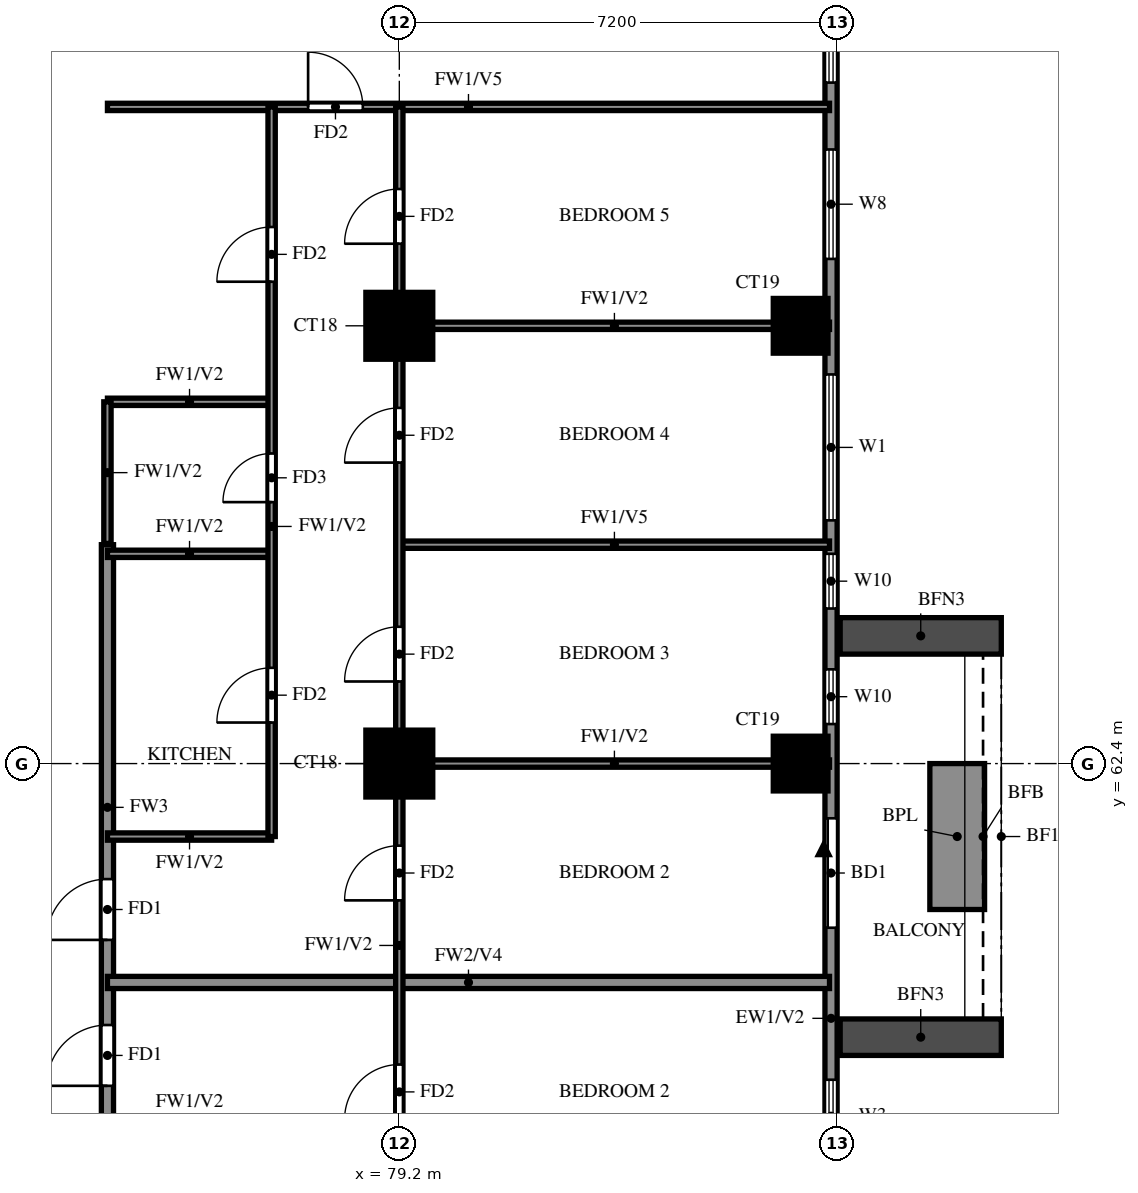
"""IFC4 building model, lengths in metres.
Left out: names, types, materials, properties, quantities, classifications, styles, units other than length and angle.
Written with IfcOpenShell. Run it as: python <this file> out.ifc"""

import sys

from ifc_helpers import new_model, si_unit, direction, frame, frame_2d, origin, origin_2d, place, context, subcontext, project, spatial, rectangle, extrude, source, transform, mapped, element, fill, save


model = new_model("IFC4")
c1 = context("Model", 3, precision=1e-05, world=origin(), true_north=direction((0.0, 1.0)))
c2 = subcontext(c1, "Body", "Model", "MODEL_VIEW")
j1 = project(units=[si_unit("LENGTHUNIT", "METRE"), si_unit("PLANEANGLEUNIT", "RADIAN")], contexts=[c1])
p1 = place(None, origin())
s1 = spatial("IfcSite", under=j1, at=p1, CompositionType="ELEMENT")
p2 = place(p1, origin())
s2 = spatial("IfcBuilding", under=s1, at=p2, CompositionType="ELEMENT")
p3 = place(p2, frame((0.0, 0.0, 127.0)))
s3 = spatial("IfcBuildingStorey", under=s2, at=p3, CompositionType="ELEMENT", Elevation=127.0)
m1 = source(origin(), c2, "Body", "SweptSolid", [
    extrude(rectangle(XDim=1.1, YDim=1.1, at=origin_2d()), origin(), (0.0, 0.0, 1.0), 3.2),
])
p4 = place(p3, frame((79.2, 62.4, 0.0), z_axis=(0.0, 0.0, 1.0), x_axis=(1.0, 0.0, 0.0)))
e1 = element("IfcColumn", 1, at=p4, inside=s3, PredefinedType="COLUMN", context=c2, shape_type="MappedRepresentation", body=[
    mapped(m1, transform((0.0, 0.0, 0.0))),
])
m2 = source(origin(), c2, "Body", "SweptSolid", [
    extrude(rectangle(XDim=0.9, YDim=0.9, at=origin_2d()), origin(), (0.0, 0.0, 1.0), 3.2),
])
p5 = place(p3, frame((85.8, 62.4, 0.0), z_axis=(0.0, 0.0, 1.0), x_axis=(1.0, 0.0, 0.0)))
e2 = element("IfcColumn", 2, at=p5, inside=s3, PredefinedType="COLUMN", context=c2, shape_type="MappedRepresentation", body=[
    mapped(m2, transform((0.0, 0.0, 0.0))),
])
p6 = place(p3, frame((79.2, 69.6, 0.0), z_axis=(0.0, 0.0, 1.0), x_axis=(1.0, 0.0, 0.0)))
e3 = element("IfcColumn", 3, at=p6, inside=s3, PredefinedType="COLUMN", context=c2, shape_type="MappedRepresentation", body=[
    mapped(m1, transform((0.0, 0.0, 0.0))),
])
p7 = place(p3, frame((85.8, 69.6, 0.0), z_axis=(0.0, 0.0, 1.0), x_axis=(1.0, 0.0, 0.0)))
e4 = element("IfcColumn", 4, at=p7, inside=s3, PredefinedType="COLUMN", context=c2, shape_type="MappedRepresentation", body=[
    mapped(m2, transform((0.0, 0.0, 0.0))),
])
p8 = place(p3, frame((86.3, 48.2, 0.0), z_axis=(0.0, 0.0, 1.0), x_axis=(0.0, 1.0, 0.0)))
e5 = element("IfcWall", 5, at=p8, inside=s3, PredefinedType="SOLIDWALL", context=c2, shape_type="SweptSolid", body=[
    extrude(rectangle(XDim=28.6, YDim=0.2, at=frame_2d((14.3, 0.0))), origin(), (0.0, 0.0, 1.0), 3.2),
])
p9 = place(p8, frame((11.5, 0.0, 0.0)))
e6 = element("IfcOpeningElement", 6, at=p9, cuts=e5, PredefinedType="OPENING", context=c2, shape_type="SweptSolid", body=[
    extrude(rectangle(XDim=1.8, YDim=2.4, at=frame_2d((0.9, 1.2))), frame((0.0, 0.11, 0.0), z_axis=(0.0, -1.0, 0.0), x_axis=(1.0, 0.0, 0.0)), (0.0, 0.0, 1.0), 0.22),
])
p10 = place(p8, frame((0.767, 0.0, 0.6)))
e7 = element("IfcOpeningElement", 7, at=p10, cuts=e5, PredefinedType="OPENING", context=c2, shape_type="SweptSolid", body=[
    extrude(rectangle(XDim=2.4, YDim=2.4, at=frame_2d((1.2, 1.2))), frame((0.0, 0.11, 0.0), z_axis=(0.0, -1.0, 0.0), x_axis=(1.0, 0.0, 0.0)), (0.0, 0.0, 1.0), 0.22),
])
p11 = place(p8, frame((3.633, 0.0, 0.6)))
e8 = element("IfcOpeningElement", 8, at=p11, cuts=e5, PredefinedType="OPENING", context=c2, shape_type="SweptSolid", body=[
    extrude(rectangle(XDim=2.4, YDim=2.4, at=frame_2d((1.2, 1.2))), frame((0.0, 0.11, 0.0), z_axis=(0.0, -1.0, 0.0), x_axis=(1.0, 0.0, 0.0)), (0.0, 0.0, 1.0), 0.22),
])
p12 = place(p8, frame((7.8, 0.0, 0.6)))
e9 = element("IfcOpeningElement", 9, at=p12, cuts=e5, PredefinedType="OPENING", context=c2, shape_type="SweptSolid", body=[
    extrude(rectangle(XDim=1.2, YDim=2.4, at=frame_2d((0.6, 1.2))), frame((0.0, 0.11, 0.0), z_axis=(0.0, -1.0, 0.0), x_axis=(1.0, 0.0, 0.0)), (0.0, 0.0, 1.0), 0.22),
])
p13 = place(p8, frame((14.85, 0.0, 0.6)))
e10 = element("IfcOpeningElement", 10, at=p13, cuts=e5, PredefinedType="OPENING", context=c2, shape_type="SweptSolid", body=[
    extrude(rectangle(XDim=0.9, YDim=2.4, at=frame_2d((0.45, 1.2))), frame((0.0, 0.11, 0.0), z_axis=(0.0, -1.0, 0.0), x_axis=(1.0, 0.0, 0.0)), (0.0, 0.0, 1.0), 0.22),
])
p14 = place(p8, frame((16.75, 0.0, 0.6)))
e11 = element("IfcOpeningElement", 11, at=p14, cuts=e5, PredefinedType="OPENING", context=c2, shape_type="SweptSolid", body=[
    extrude(rectangle(XDim=0.9, YDim=2.4, at=frame_2d((0.45, 1.2))), frame((0.0, 0.11, 0.0), z_axis=(0.0, -1.0, 0.0), x_axis=(1.0, 0.0, 0.0)), (0.0, 0.0, 1.0), 0.22),
])
p15 = place(p8, frame((18.2, 0.0, 0.6)))
e12 = element("IfcOpeningElement", 12, at=p15, cuts=e5, PredefinedType="OPENING", context=c2, shape_type="SweptSolid", body=[
    extrude(rectangle(XDim=2.4, YDim=2.4, at=frame_2d((1.2, 1.2))), frame((0.0, 0.11, 0.0), z_axis=(0.0, -1.0, 0.0), x_axis=(1.0, 0.0, 0.0)), (0.0, 0.0, 1.0), 0.22),
])
p16 = place(p8, frame((22.5, 0.0, 0.6)))
e13 = element("IfcOpeningElement", 13, at=p16, cuts=e5, PredefinedType="OPENING", context=c2, shape_type="SweptSolid", body=[
    extrude(rectangle(XDim=1.8, YDim=2.4, at=frame_2d((0.9, 1.2))), frame((0.0, 0.11, 0.0), z_axis=(0.0, -1.0, 0.0), x_axis=(1.0, 0.0, 0.0)), (0.0, 0.0, 1.0), 0.22),
])
p17 = place(p8, frame((25.4, 0.0, 0.6)))
e14 = element("IfcOpeningElement", 14, at=p17, cuts=e5, PredefinedType="OPENING", context=c2, shape_type="SweptSolid", body=[
    extrude(rectangle(XDim=2.4, YDim=2.4, at=frame_2d((1.2, 1.2))), frame((0.0, 0.11, 0.0), z_axis=(0.0, -1.0, 0.0), x_axis=(1.0, 0.0, 0.0)), (0.0, 0.0, 1.0), 0.22),
])
for number, where, z_axis, x_axis in (
    (15, (86.45, 57.9, 0.0), (0.0, 0.0, 1.0), (1.0, 0.0, 0.0)),
    (16, (86.45, 64.5, 0.0), (0.0, 0.0, 1.0), (1.0, 0.0, 0.0)),
):
    element("IfcWall", number, at=place(p3, frame(where, z_axis=z_axis, x_axis=x_axis)), inside=s3, PredefinedType="SOLIDWALL", context=c2, shape_type="SweptSolid", body=[
        extrude(rectangle(XDim=2.65, YDim=0.6, at=frame_2d((1.325, 0.0))), origin(), (0.0, 0.0, 1.0), 2.85),
    ])
p18 = place(p3, frame((88.375, 60.0, 0.0), z_axis=(0.0, 0.0, 1.0), x_axis=(0.0, 1.0, 0.0)))
e17 = element("IfcWall", 17, at=p18, inside=s3, PredefinedType="SOLIDWALL", context=c2, shape_type="SweptSolid", body=[
    extrude(rectangle(XDim=2.4, YDim=0.9, at=frame_2d((1.2, 0.0))), origin(), (0.0, 0.0, 1.0), 0.9),
])
p19 = place(p3, frame((74.4, 56.4, 0.0), z_axis=(0.0, 0.0, 1.0), x_axis=(0.0, 1.0, 0.0)))
e18 = element("IfcWall", 18, at=p19, inside=s3, PredefinedType="SOLIDWALL", context=c2, shape_type="SweptSolid", body=[
    extrude(rectangle(XDim=9.6, YDim=0.2, at=frame_2d((4.8, 0.0))), origin(), (0.0, 0.0, 1.0), 3.2),
])
p20 = place(p19, frame((0.7, 0.0, 0.0)))
e19 = element("IfcOpeningElement", 19, at=p20, cuts=e18, PredefinedType="OPENING", context=c2, shape_type="SweptSolid", body=[
    extrude(rectangle(XDim=1.0, YDim=2.1, at=frame_2d((0.5, 1.05))), frame((0.0, 0.11, 0.0), z_axis=(0.0, -1.0, 0.0), x_axis=(1.0, 0.0, 0.0)), (0.0, 0.0, 1.0), 0.22),
])
p21 = place(p19, frame((3.1, 0.0, 0.0)))
e20 = element("IfcOpeningElement", 20, at=p21, cuts=e18, PredefinedType="OPENING", context=c2, shape_type="SweptSolid", body=[
    extrude(rectangle(XDim=1.0, YDim=2.1, at=frame_2d((0.5, 1.05))), frame((0.0, 0.11, 0.0), z_axis=(0.0, -1.0, 0.0), x_axis=(1.0, 0.0, 0.0)), (0.0, 0.0, 1.0), 0.22),
])
p22 = place(p3, frame((74.4, 58.8, 0.0), z_axis=(0.0, 0.0, 1.0), x_axis=(1.0, 0.0, 0.0)))
e21 = element("IfcWall", 21, at=p22, inside=s3, PredefinedType="SOLIDWALL", context=c2, shape_type="SweptSolid", body=[
    extrude(rectangle(XDim=11.875, YDim=0.2, at=frame_2d((5.938, 0.0))), origin(), (0.0, 0.0, 1.0), 2.3),
])
p23 = place(p3, frame((74.4, 61.2, 0.0), z_axis=(0.0, 0.0, 1.0), x_axis=(1.0, 0.0, 0.0)))
e22 = element("IfcWall", 22, at=p23, inside=s3, PredefinedType="PARTITIONING", context=c2, shape_type="SweptSolid", body=[
    extrude(rectangle(XDim=2.7, YDim=0.12, at=frame_2d((1.35, 0.0))), origin(), (0.0, 0.0, 1.0), 3.2),
])
p24 = place(p3, frame((79.2, 62.4, 0.0), z_axis=(0.0, 0.0, 1.0), x_axis=(1.0, 0.0, 0.0)))
e23 = element("IfcWall", 23, at=p24, inside=s3, PredefinedType="PARTITIONING", context=c2, shape_type="SweptSolid", body=[
    extrude(rectangle(XDim=7.075, YDim=0.12, at=frame_2d((3.538, 0.0))), origin(), (0.0, 0.0, 1.0), 3.2),
])
p25 = place(p3, frame((74.4, 65.85, 0.0), z_axis=(0.0, 0.0, 1.0), x_axis=(1.0, 0.0, 0.0)))
e24 = element("IfcWall", 24, at=p25, inside=s3, PredefinedType="PARTITIONING", context=c2, shape_type="SweptSolid", body=[
    extrude(rectangle(XDim=2.7, YDim=0.12, at=frame_2d((1.35, 0.0))), origin(), (0.0, 0.0, 1.0), 3.2),
])
p26 = place(p3, frame((79.2, 66.0, 0.0), z_axis=(0.0, 0.0, 1.0), x_axis=(1.0, 0.0, 0.0)))
e25 = element("IfcWall", 25, at=p26, inside=s3, PredefinedType="PARTITIONING", context=c2, shape_type="SweptSolid", body=[
    extrude(rectangle(XDim=7.075, YDim=0.12, at=frame_2d((3.538, 0.0))), origin(), (0.0, 0.0, 1.0), 2.3),
])
p27 = place(p3, frame((74.4, 68.35, 0.0), z_axis=(0.0, 0.0, 1.0), x_axis=(1.0, 0.0, 0.0)))
e26 = element("IfcWall", 26, at=p27, inside=s3, PredefinedType="PARTITIONING", context=c2, shape_type="SweptSolid", body=[
    extrude(rectangle(XDim=2.7, YDim=0.12, at=frame_2d((1.35, 0.0))), origin(), (0.0, 0.0, 1.0), 3.2),
])
p28 = place(p3, frame((79.2, 69.6, 0.0), z_axis=(0.0, 0.0, 1.0), x_axis=(1.0, 0.0, 0.0)))
e27 = element("IfcWall", 27, at=p28, inside=s3, PredefinedType="PARTITIONING", context=c2, shape_type="SweptSolid", body=[
    extrude(rectangle(XDim=7.075, YDim=0.12, at=frame_2d((3.538, 0.0))), origin(), (0.0, 0.0, 1.0), 3.2),
])
p29 = place(p3, frame((74.4, 73.2, 0.0), z_axis=(0.0, 0.0, 1.0), x_axis=(1.0, 0.0, 0.0)))
e28 = element("IfcWall", 28, at=p29, inside=s3, PredefinedType="PARTITIONING", context=c2, shape_type="SweptSolid", body=[
    extrude(rectangle(XDim=11.875, YDim=0.12, at=frame_2d((5.938, 0.0))), origin(), (0.0, 0.0, 1.0), 2.3),
])
p30 = place(p29, frame((3.3, 0.0, 0.0)))
e29 = element("IfcOpeningElement", 29, at=p30, cuts=e28, PredefinedType="OPENING", context=c2, shape_type="SweptSolid", body=[
    extrude(rectangle(XDim=0.9, YDim=2.1, at=frame_2d((0.45, 1.05))), frame((0.0, 0.07, 0.0), z_axis=(0.0, -1.0, 0.0), x_axis=(1.0, 0.0, 0.0)), (0.0, 0.0, 1.0), 0.14),
])
p31 = place(p3, frame((74.4, 66.02, 0.0), z_axis=(0.0, 0.0, 1.0), x_axis=(0.0, 1.0, 0.0)))
e30 = element("IfcWall", 30, at=p31, inside=s3, PredefinedType="PARTITIONING", context=c2, shape_type="SweptSolid", body=[
    extrude(rectangle(XDim=2.33, YDim=0.12, at=frame_2d((1.165, 0.0))), origin(), (0.0, 0.0, 1.0), 3.2),
])
p32 = place(p3, frame((77.1, 61.2, 0.0), z_axis=(0.0, 0.0, 1.0), x_axis=(0.0, 1.0, 0.0)))
e31 = element("IfcWall", 31, at=p32, inside=s3, PredefinedType="PARTITIONING", context=c2, shape_type="SweptSolid", body=[
    extrude(rectangle(XDim=12.0, YDim=0.12, at=frame_2d((6.0, 0.0))), origin(), (0.0, 0.0, 1.0), 3.2),
])
p33 = place(p32, frame((1.875, 0.0, 0.0)))
e32 = element("IfcOpeningElement", 32, at=p33, cuts=e31, PredefinedType="OPENING", context=c2, shape_type="SweptSolid", body=[
    extrude(rectangle(XDim=0.9, YDim=2.1, at=frame_2d((0.45, 1.05))), frame((0.0, 0.07, 0.0), z_axis=(0.0, -1.0, 0.0), x_axis=(1.0, 0.0, 0.0)), (0.0, 0.0, 1.0), 0.14),
])
p34 = place(p32, frame((5.5, 0.0, 0.0)))
e33 = element("IfcOpeningElement", 33, at=p34, cuts=e31, PredefinedType="OPENING", context=c2, shape_type="SweptSolid", body=[
    extrude(rectangle(XDim=0.8, YDim=2.1, at=frame_2d((0.4, 1.05))), frame((0.0, 0.07, 0.0), z_axis=(0.0, -1.0, 0.0), x_axis=(1.0, 0.0, 0.0)), (0.0, 0.0, 1.0), 0.14),
])
p35 = place(p32, frame((9.125, 0.0, 0.0)))
e34 = element("IfcOpeningElement", 34, at=p35, cuts=e31, PredefinedType="OPENING", context=c2, shape_type="SweptSolid", body=[
    extrude(rectangle(XDim=0.9, YDim=2.1, at=frame_2d((0.45, 1.05))), frame((0.0, 0.07, 0.0), z_axis=(0.0, -1.0, 0.0), x_axis=(1.0, 0.0, 0.0)), (0.0, 0.0, 1.0), 0.14),
])
p36 = place(p3, frame((79.2, 48.125, 0.0), z_axis=(0.0, 0.0, 1.0), x_axis=(0.0, 1.0, 0.0)))
e35 = element("IfcWall", 35, at=p36, inside=s3, PredefinedType="PARTITIONING", context=c2, shape_type="SweptSolid", body=[
    extrude(rectangle(XDim=25.075, YDim=0.12, at=frame_2d((12.538, 0.0))), origin(), (0.0, 0.0, 1.0), 3.2),
])
p37 = place(p36, frame((2.788, 0.0, 0.0)))
e36 = element("IfcOpeningElement", 36, at=p37, cuts=e35, PredefinedType="OPENING", context=c2, shape_type="SweptSolid", body=[
    extrude(rectangle(XDim=1.5, YDim=2.1, at=frame_2d((0.75, 1.05))), frame((0.0, 0.07, 0.0), z_axis=(0.0, -1.0, 0.0), x_axis=(1.0, 0.0, 0.0)), (0.0, 0.0, 1.0), 0.14),
])
p38 = place(p36, frame((8.425, 0.0, 0.0)))
e37 = element("IfcOpeningElement", 37, at=p38, cuts=e35, PredefinedType="OPENING", context=c2, shape_type="SweptSolid", body=[
    extrude(rectangle(XDim=0.9, YDim=2.1, at=frame_2d((0.45, 1.05))), frame((0.0, 0.07, 0.0), z_axis=(0.0, -1.0, 0.0), x_axis=(1.0, 0.0, 0.0)), (0.0, 0.0, 1.0), 0.14),
])
p39 = place(p36, frame((12.025, 0.0, 0.0)))
e38 = element("IfcOpeningElement", 38, at=p39, cuts=e35, PredefinedType="OPENING", context=c2, shape_type="SweptSolid", body=[
    extrude(rectangle(XDim=0.9, YDim=2.1, at=frame_2d((0.45, 1.05))), frame((0.0, 0.07, 0.0), z_axis=(0.0, -1.0, 0.0), x_axis=(1.0, 0.0, 0.0)), (0.0, 0.0, 1.0), 0.14),
])
p40 = place(p36, frame((15.625, 0.0, 0.0)))
e39 = element("IfcOpeningElement", 39, at=p40, cuts=e35, PredefinedType="OPENING", context=c2, shape_type="SweptSolid", body=[
    extrude(rectangle(XDim=0.9, YDim=2.1, at=frame_2d((0.45, 1.05))), frame((0.0, 0.07, 0.0), z_axis=(0.0, -1.0, 0.0), x_axis=(1.0, 0.0, 0.0)), (0.0, 0.0, 1.0), 0.14),
])
p41 = place(p36, frame((19.225, 0.0, 0.0)))
e40 = element("IfcOpeningElement", 40, at=p41, cuts=e35, PredefinedType="OPENING", context=c2, shape_type="SweptSolid", body=[
    extrude(rectangle(XDim=0.9, YDim=2.1, at=frame_2d((0.45, 1.05))), frame((0.0, 0.07, 0.0), z_axis=(0.0, -1.0, 0.0), x_axis=(1.0, 0.0, 0.0)), (0.0, 0.0, 1.0), 0.14),
])
p42 = place(p36, frame((22.825, 0.0, 0.0)))
e41 = element("IfcOpeningElement", 41, at=p42, cuts=e35, PredefinedType="OPENING", context=c2, shape_type="SweptSolid", body=[
    extrude(rectangle(XDim=0.9, YDim=2.1, at=frame_2d((0.45, 1.05))), frame((0.0, 0.07, 0.0), z_axis=(0.0, -1.0, 0.0), x_axis=(1.0, 0.0, 0.0)), (0.0, 0.0, 1.0), 0.14),
])
p43 = place(p9, origin())
e42 = element("IfcDoor", 42, at=p43, inside=s3, OperationType="DOUBLE_DOOR_SLIDING", PredefinedType="DOOR", context=c2, shape_type="SweptSolid", body=[
    extrude(rectangle(XDim=1.8, YDim=2.4, at=frame_2d((0.9, 1.2))), frame((0.0, 0.025, 0.0), z_axis=(0.0, -1.0, 0.0), x_axis=(1.0, 0.0, 0.0)), (0.0, 0.0, 1.0), 0.05),
])
fill(e6, e42)
p44 = place(p12, origin())
e43 = element("IfcWindow", 43, at=p44, inside=s3, PartitioningType="SINGLE_PANEL", PredefinedType="WINDOW", context=c2, shape_type="SweptSolid", body=[
    extrude(rectangle(XDim=1.2, YDim=2.4, at=frame_2d((0.6, 1.2))), frame((0.0, 0.03, 0.0), z_axis=(0.0, -1.0, 0.0), x_axis=(1.0, 0.0, 0.0)), (0.0, 0.0, 1.0), 0.06),
])
fill(e9, e43)
p45 = place(p13, origin())
e44 = element("IfcWindow", 44, at=p45, inside=s3, PartitioningType="SINGLE_PANEL", PredefinedType="WINDOW", context=c2, shape_type="SweptSolid", body=[
    extrude(rectangle(XDim=0.9, YDim=2.4, at=frame_2d((0.45, 1.2))), frame((0.0, 0.03, 0.0), z_axis=(0.0, -1.0, 0.0), x_axis=(1.0, 0.0, 0.0)), (0.0, 0.0, 1.0), 0.06),
])
fill(e10, e44)
p46 = place(p14, origin())
e45 = element("IfcWindow", 45, at=p46, inside=s3, PartitioningType="SINGLE_PANEL", PredefinedType="WINDOW", context=c2, shape_type="SweptSolid", body=[
    extrude(rectangle(XDim=0.9, YDim=2.4, at=frame_2d((0.45, 1.2))), frame((0.0, 0.03, 0.0), z_axis=(0.0, -1.0, 0.0), x_axis=(1.0, 0.0, 0.0)), (0.0, 0.0, 1.0), 0.06),
])
fill(e11, e45)
p47 = place(p15, origin())
e46 = element("IfcWindow", 46, at=p47, inside=s3, PartitioningType="DOUBLE_PANEL_VERTICAL", PredefinedType="WINDOW", context=c2, shape_type="SweptSolid", body=[
    extrude(rectangle(XDim=2.4, YDim=2.4, at=frame_2d((1.2, 1.2))), frame((0.0, 0.03, 0.0), z_axis=(0.0, -1.0, 0.0), x_axis=(1.0, 0.0, 0.0)), (0.0, 0.0, 1.0), 0.06),
])
fill(e12, e46)
p48 = place(p16, origin())
e47 = element("IfcWindow", 47, at=p48, inside=s3, PartitioningType="DOUBLE_PANEL_VERTICAL", PredefinedType="WINDOW", context=c2, shape_type="SweptSolid", body=[
    extrude(rectangle(XDim=1.8, YDim=2.4, at=frame_2d((0.9, 1.2))), frame((0.0, 0.03, 0.0), z_axis=(0.0, -1.0, 0.0), x_axis=(1.0, 0.0, 0.0)), (0.0, 0.0, 1.0), 0.06),
])
fill(e13, e47)
p49 = place(p17, origin())
e48 = element("IfcWindow", 48, at=p49, inside=s3, PartitioningType="DOUBLE_PANEL_VERTICAL", PredefinedType="WINDOW", context=c2, shape_type="SweptSolid", body=[
    extrude(rectangle(XDim=2.4, YDim=2.4, at=frame_2d((1.2, 1.2))), frame((0.0, 0.03, 0.0), z_axis=(0.0, -1.0, 0.0), x_axis=(1.0, 0.0, 0.0)), (0.0, 0.0, 1.0), 0.06),
])
fill(e14, e48)
p50 = place(p20, origin())
e49 = element("IfcDoor", 49, at=p50, inside=s3, OperationType="SINGLE_SWING_RIGHT", PredefinedType="DOOR", context=c2, shape_type="SweptSolid", body=[
    extrude(rectangle(XDim=1.0, YDim=2.1, at=frame_2d((0.5, 1.05))), frame((0.0, 0.025, 0.0), z_axis=(0.0, -1.0, 0.0), x_axis=(1.0, 0.0, 0.0)), (0.0, 0.0, 1.0), 0.05),
])
fill(e19, e49)
p51 = place(p38, origin())
e50 = element("IfcDoor", 50, at=p51, inside=s3, OperationType="SINGLE_SWING_LEFT", PredefinedType="DOOR", context=c2, shape_type="SweptSolid", body=[
    extrude(rectangle(XDim=0.9, YDim=2.1, at=frame_2d((0.45, 1.05))), frame((0.0, 0.025, 0.0), z_axis=(0.0, -1.0, 0.0), x_axis=(1.0, 0.0, 0.0)), (0.0, 0.0, 1.0), 0.05),
])
fill(e37, e50)
p52 = place(p21, origin())
e51 = element("IfcDoor", 51, at=p52, inside=s3, OperationType="SINGLE_SWING_LEFT", PredefinedType="DOOR", context=c2, shape_type="SweptSolid", body=[
    extrude(rectangle(XDim=1.0, YDim=2.1, at=frame_2d((0.5, 1.05))), frame((0.0, 0.025, 0.0), z_axis=(0.0, -1.0, 0.0), x_axis=(1.0, 0.0, 0.0)), (0.0, 0.0, 1.0), 0.05),
])
fill(e20, e51)
p53 = place(p39, origin())
e52 = element("IfcDoor", 52, at=p53, inside=s3, OperationType="SINGLE_SWING_LEFT", PredefinedType="DOOR", context=c2, shape_type="SweptSolid", body=[
    extrude(rectangle(XDim=0.9, YDim=2.1, at=frame_2d((0.45, 1.05))), frame((0.0, 0.025, 0.0), z_axis=(0.0, -1.0, 0.0), x_axis=(1.0, 0.0, 0.0)), (0.0, 0.0, 1.0), 0.05),
])
fill(e38, e52)
p54 = place(p40, origin())
e53 = element("IfcDoor", 53, at=p54, inside=s3, OperationType="SINGLE_SWING_RIGHT", PredefinedType="DOOR", context=c2, shape_type="SweptSolid", body=[
    extrude(rectangle(XDim=0.9, YDim=2.1, at=frame_2d((0.45, 1.05))), frame((0.0, 0.025, 0.0), z_axis=(0.0, -1.0, 0.0), x_axis=(1.0, 0.0, 0.0)), (0.0, 0.0, 1.0), 0.05),
])
fill(e39, e53)
p55 = place(p41, origin())
e54 = element("IfcDoor", 54, at=p55, inside=s3, OperationType="SINGLE_SWING_LEFT", PredefinedType="DOOR", context=c2, shape_type="SweptSolid", body=[
    extrude(rectangle(XDim=0.9, YDim=2.1, at=frame_2d((0.45, 1.05))), frame((0.0, 0.025, 0.0), z_axis=(0.0, -1.0, 0.0), x_axis=(1.0, 0.0, 0.0)), (0.0, 0.0, 1.0), 0.05),
])
fill(e40, e54)
p56 = place(p42, origin())
e55 = element("IfcDoor", 55, at=p56, inside=s3, OperationType="SINGLE_SWING_LEFT", PredefinedType="DOOR", context=c2, shape_type="SweptSolid", body=[
    extrude(rectangle(XDim=0.9, YDim=2.1, at=frame_2d((0.45, 1.05))), frame((0.0, 0.025, 0.0), z_axis=(0.0, -1.0, 0.0), x_axis=(1.0, 0.0, 0.0)), (0.0, 0.0, 1.0), 0.05),
])
fill(e41, e55)
p57 = place(p30, origin())
e56 = element("IfcDoor", 56, at=p57, inside=s3, OperationType="SINGLE_SWING_RIGHT", PredefinedType="DOOR", context=c2, shape_type="SweptSolid", body=[
    extrude(rectangle(XDim=0.9, YDim=2.1, at=frame_2d((0.45, 1.05))), frame((0.0, 0.025, 0.0), z_axis=(0.0, -1.0, 0.0), x_axis=(1.0, 0.0, 0.0)), (0.0, 0.0, 1.0), 0.05),
])
fill(e29, e56)
p58 = place(p33, origin())
e57 = element("IfcDoor", 57, at=p58, inside=s3, OperationType="SINGLE_SWING_LEFT", PredefinedType="DOOR", context=c2, shape_type="SweptSolid", body=[
    extrude(rectangle(XDim=0.9, YDim=2.1, at=frame_2d((0.45, 1.05))), frame((0.0, 0.025, 0.0), z_axis=(0.0, -1.0, 0.0), x_axis=(1.0, 0.0, 0.0)), (0.0, 0.0, 1.0), 0.05),
])
fill(e32, e57)
p59 = place(p34, origin())
e58 = element("IfcDoor", 58, at=p59, inside=s3, OperationType="SINGLE_SWING_LEFT", PredefinedType="DOOR", context=c2, shape_type="SweptSolid", body=[
    extrude(rectangle(XDim=0.8, YDim=2.1, at=frame_2d((0.4, 1.05))), frame((0.0, 0.025, 0.0), z_axis=(0.0, -1.0, 0.0), x_axis=(1.0, 0.0, 0.0)), (0.0, 0.0, 1.0), 0.05),
])
fill(e33, e58)
p60 = place(p35, origin())
e59 = element("IfcDoor", 59, at=p60, inside=s3, OperationType="SINGLE_SWING_RIGHT", PredefinedType="DOOR", context=c2, shape_type="SweptSolid", body=[
    extrude(rectangle(XDim=0.9, YDim=2.1, at=frame_2d((0.45, 1.05))), frame((0.0, 0.025, 0.0), z_axis=(0.0, -1.0, 0.0), x_axis=(1.0, 0.0, 0.0)), (0.0, 0.0, 1.0), 0.05),
])
fill(e34, e59)
save(model, sys.argv[1])
